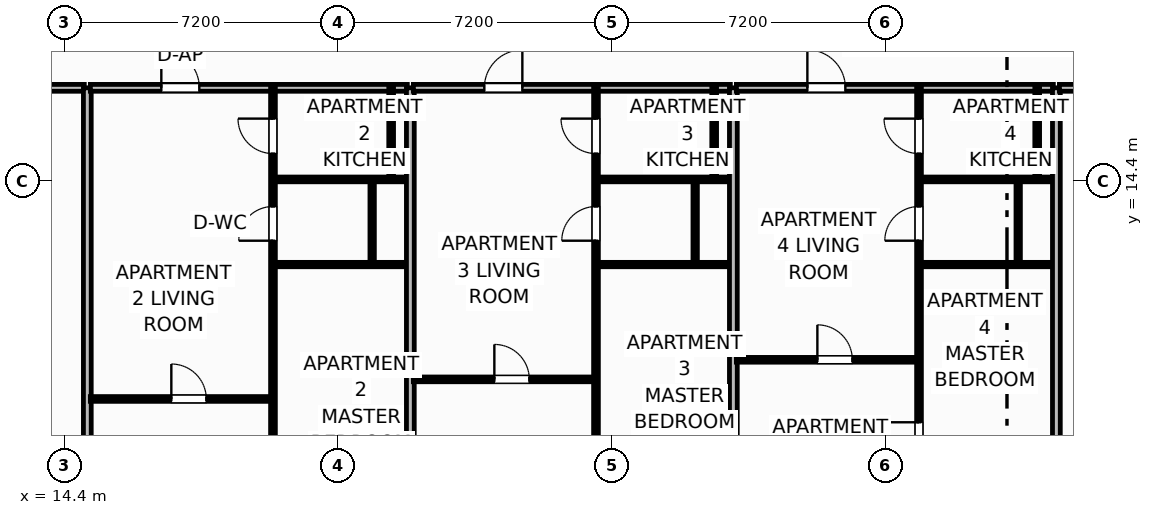
"""IFC4 building model, lengths in metres.
Left out: names, types, materials, properties, quantities, classifications, styles, units other than length and angle.
Written with IfcOpenShell. Run it as: python <this file> out.ifc"""

import sys

from ifc_helpers import new_model, si_unit, direction, frame, frame_2d, origin, place, context, subcontext, project, spatial, rectangle, extrude, element, fill, save


model = new_model("IFC4")
c1 = context("Model", 3, precision=1e-05, world=origin(), true_north=direction((0.0, 1.0)))
c2 = subcontext(c1, "Body", "Model", "MODEL_VIEW")
j1 = project(units=[si_unit("LENGTHUNIT", "METRE"), si_unit("PLANEANGLEUNIT", "RADIAN")], contexts=[c1])
p1 = place(None, origin())
s1 = spatial("IfcSite", under=j1, at=p1, CompositionType="ELEMENT")
p2 = place(p1, origin())
s2 = spatial("IfcBuilding", under=s1, at=p2, CompositionType="ELEMENT")
p3 = place(p2, frame((0.0, 0.0, 196.8)))
s3 = spatial("IfcBuildingStorey", under=s2, at=p3, CompositionType="ELEMENT", Elevation=196.8)
p4 = place(p3, frame((4.847, 16.85, 0.0), z_axis=(0.0, 0.0, 1.0), x_axis=(1.0, 0.0, 0.0)))
e1 = element("IfcWall", 1, at=p4, inside=s3, PredefinedType="PARTITIONING", context=c2, shape_type="SweptSolid", body=[
    extrude(rectangle(XDim=10.073, YDim=0.18, at=frame_2d((5.037, 0.0))), origin(), (0.0, 0.0, 1.0), 3.45),
])
p5 = place(p4, frame((7.878, 0.0, 0.0)))
e2 = element("IfcOpeningElement", 2, at=p5, cuts=e1, PredefinedType="OPENING", context=c2, shape_type="SweptSolid", body=[
    extrude(rectangle(XDim=0.95, YDim=2.05, at=frame_2d((0.475, 1.025))), frame((0.0, 0.1, 0.0), z_axis=(0.0, -1.0, 0.0), x_axis=(1.0, 0.0, 0.0)), (0.0, 0.0, 1.0), 0.2),
])
p6 = place(p3, frame((15.0, 0.447, 0.0), z_axis=(0.0, 0.0, 1.0), x_axis=(0.0, 1.0, 0.0)))
e3 = element("IfcWall", 3, at=p6, inside=s3, PredefinedType="PARTITIONING", context=c2, shape_type="SweptSolid", body=[
    extrude(rectangle(XDim=16.403, YDim=0.205, at=frame_2d((8.202, 0.0))), origin(), (0.0, 0.0, 1.0), 3.45),
])
p7 = place(p3, frame((15.08, 8.663, 0.0), z_axis=(0.0, 0.0, 1.0), x_axis=(1.0, 0.0, 0.0)))
e4 = element("IfcWall", 4, at=p7, inside=s3, PredefinedType="PARTITIONING", context=c2, shape_type="SweptSolid", body=[
    extrude(rectangle(XDim=4.735, YDim=0.125, at=frame_2d((2.368, 0.0))), origin(), (0.0, 0.0, 1.0), 3.45),
])
p8 = place(p7, frame((2.131, 0.0, 0.0)))
e5 = element("IfcOpeningElement", 5, at=p8, cuts=e4, PredefinedType="OPENING", context=c2, shape_type="SweptSolid", body=[
    extrude(rectangle(XDim=0.92, YDim=2.05, at=frame_2d((0.46, 1.025))), frame((0.0, 0.073, 0.0), z_axis=(0.0, -1.0, 0.0), x_axis=(1.0, 0.0, 0.0)), (0.0, 0.0, 1.0), 0.145),
])
p9 = place(p3, frame((15.08, 16.85, 0.0), z_axis=(0.0, 0.0, 1.0), x_axis=(1.0, 0.0, 0.0)))
e6 = element("IfcWall", 6, at=p9, inside=s3, PredefinedType="PARTITIONING", context=c2, shape_type="SweptSolid", body=[
    extrude(rectangle(XDim=8.34, YDim=0.18, at=frame_2d((4.17, 0.0))), origin(), (0.0, 0.0, 1.0), 3.45),
])
p10 = place(p9, frame((1.868, 0.0, 0.0)))
e7 = element("IfcOpeningElement", 7, at=p10, cuts=e6, PredefinedType="OPENING", context=c2, shape_type="SweptSolid", body=[
    extrude(rectangle(XDim=1.0, YDim=2.2, at=frame_2d((0.5, 1.1))), frame((0.0, 0.1, 0.0), z_axis=(0.0, -1.0, 0.0), x_axis=(1.0, 0.0, 0.0)), (0.0, 0.0, 1.0), 0.2),
])
p11 = place(p3, frame((19.885, 1.039, 0.0), z_axis=(0.0, 0.0, 1.0), x_axis=(0.0, 1.0, 0.0)))
e8 = element("IfcWall", 8, at=p11, inside=s3, PredefinedType="PARTITIONING", context=c2, shape_type="SweptSolid", body=[
    extrude(rectangle(XDim=15.811, YDim=0.125, at=frame_2d((7.905, 0.0))), origin(), (0.0, 0.0, 1.0), 3.45),
])
p12 = place(p11, frame((5.06, 0.0, 0.0)))
e9 = element("IfcOpeningElement", 9, at=p12, cuts=e8, PredefinedType="OPENING", context=c2, shape_type="SweptSolid", body=[
    extrude(rectangle(XDim=0.92, YDim=2.05, at=frame_2d((0.46, 1.025))), frame((0.0, 0.073, 0.0), z_axis=(0.0, -1.0, 0.0), x_axis=(1.0, 0.0, 0.0)), (0.0, 0.0, 1.0), 0.145),
])
p13 = place(p11, frame((11.788, 0.0, 0.0)))
e10 = element("IfcOpeningElement", 10, at=p13, cuts=e8, PredefinedType="OPENING", context=c2, shape_type="SweptSolid", body=[
    extrude(rectangle(XDim=0.9, YDim=2.05, at=frame_2d((0.45, 1.025))), frame((0.0, 0.073, 0.0), z_axis=(0.0, -1.0, 0.0), x_axis=(1.0, 0.0, 0.0)), (0.0, 0.0, 1.0), 0.145),
])
p14 = place(p11, frame((14.081, 0.0, 0.0)))
e11 = element("IfcOpeningElement", 11, at=p14, cuts=e8, PredefinedType="OPENING", context=c2, shape_type="SweptSolid", body=[
    extrude(rectangle(XDim=0.92, YDim=2.05, at=frame_2d((0.46, 1.025))), frame((0.0, 0.073, 0.0), z_axis=(0.0, -1.0, 0.0), x_axis=(1.0, 0.0, 0.0)), (0.0, 0.0, 1.0), 0.145),
])
p15 = place(p3, frame((19.955, 14.44, 0.0), z_axis=(0.0, 0.0, 1.0), x_axis=(1.0, 0.0, 0.0)))
e12 = element("IfcWall", 12, at=p15, inside=s3, PredefinedType="PARTITIONING", context=c2, shape_type="SweptSolid", body=[
    extrude(rectangle(XDim=3.465, YDim=0.125, at=frame_2d((1.732, 0.0))), origin(), (0.0, 0.0, 1.0), 3.45),
])
p16 = place(p3, frame((19.955, 12.2, 0.0), z_axis=(0.0, 0.0, 1.0), x_axis=(1.0, 0.0, 0.0)))
e13 = element("IfcWall", 13, at=p16, inside=s3, PredefinedType="PARTITIONING", context=c2, shape_type="SweptSolid", body=[
    extrude(rectangle(XDim=3.465, YDim=0.115, at=frame_2d((1.732, 0.0))), origin(), (0.0, 0.0, 1.0), 3.45),
])
p17 = place(p3, frame((22.995, 14.44, 0.0), z_axis=(0.0, 0.0, 1.0), x_axis=(0.0, 1.0, 0.0)))
e14 = element("IfcWall", 14, at=p17, inside=s3, PredefinedType="PARTITIONING", context=c2, shape_type="SweptSolid", body=[
    extrude(rectangle(XDim=2.41, YDim=0.125, at=frame_2d((1.205, 0.0))), origin(), (0.0, 0.0, 1.0), 3.45),
])
p18 = place(p3, frame((22.495, 12.2, 0.0), z_axis=(0.0, 0.0, 1.0), x_axis=(0.0, 1.0, 0.0)))
e15 = element("IfcWall", 15, at=p18, inside=s3, PredefinedType="PARTITIONING", context=c2, shape_type="SweptSolid", body=[
    extrude(rectangle(XDim=2.24, YDim=0.115, at=frame_2d((1.12, 0.0))), origin(), (0.0, 0.0, 1.0), 3.45),
])
p19 = place(p3, frame((23.5, 1.478, 0.0), z_axis=(0.0, 0.0, 1.0), x_axis=(0.0, 1.0, 0.0)))
e16 = element("IfcWall", 16, at=p19, inside=s3, PredefinedType="PARTITIONING", context=c2, shape_type="SweptSolid", body=[
    extrude(rectangle(XDim=15.373, YDim=0.205, at=frame_2d((7.686, 0.0))), origin(), (0.0, 0.0, 1.0), 2.662),
])
p20 = place(p3, frame((23.58, 9.179, 0.0), z_axis=(0.0, 0.0, 1.0), x_axis=(1.0, 0.0, 0.0)))
e17 = element("IfcWall", 17, at=p20, inside=s3, PredefinedType="PARTITIONING", context=c2, shape_type="SweptSolid", body=[
    extrude(rectangle(XDim=4.735, YDim=0.125, at=frame_2d((2.368, 0.0))), origin(), (0.0, 0.0, 1.0), 3.018),
])
p21 = place(p20, frame((2.131, 0.0, 0.0)))
e18 = element("IfcOpeningElement", 18, at=p21, cuts=e17, PredefinedType="OPENING", context=c2, shape_type="SweptSolid", body=[
    extrude(rectangle(XDim=0.92, YDim=2.05, at=frame_2d((0.46, 1.025))), frame((0.0, 0.073, 0.0), z_axis=(0.0, -1.0, 0.0), x_axis=(1.0, 0.0, 0.0)), (0.0, 0.0, 1.0), 0.145),
])
p22 = place(p3, frame((23.58, 16.85, 0.0), z_axis=(0.0, 0.0, 1.0), x_axis=(1.0, 0.0, 0.0)))
e19 = element("IfcWall", 19, at=p22, inside=s3, PredefinedType="PARTITIONING", context=c2, shape_type="SweptSolid", body=[
    extrude(rectangle(XDim=8.34, YDim=0.18, at=frame_2d((4.17, 0.0))), origin(), (0.0, 0.0, 1.0), 3.45),
])
p23 = place(p22, frame((1.868, 0.0, 0.0)))
e20 = element("IfcOpeningElement", 20, at=p23, cuts=e19, PredefinedType="OPENING", context=c2, shape_type="SweptSolid", body=[
    extrude(rectangle(XDim=1.0, YDim=2.2, at=frame_2d((0.5, 1.1))), frame((0.0, 0.1, 0.0), z_axis=(0.0, -1.0, 0.0), x_axis=(1.0, 0.0, 0.0)), (0.0, 0.0, 1.0), 0.2),
])
p24 = place(p3, frame((28.385, 4.185, 0.0), z_axis=(0.0, 0.0, 1.0), x_axis=(0.0, 1.0, 0.0)))
e21 = element("IfcWall", 21, at=p24, inside=s3, PredefinedType="PARTITIONING", context=c2, shape_type="SweptSolid", body=[
    extrude(rectangle(XDim=12.665, YDim=0.125, at=frame_2d((6.333, 0.0))), origin(), (0.0, 0.0, 1.0), 3.45),
])
p25 = place(p24, frame((2.531, 0.0, 0.0)))
e22 = element("IfcOpeningElement", 22, at=p25, cuts=e21, PredefinedType="OPENING", context=c2, shape_type="SweptSolid", body=[
    extrude(rectangle(XDim=0.92, YDim=2.05, at=frame_2d((0.46, 1.025))), frame((0.0, 0.073, 0.0), z_axis=(0.0, -1.0, 0.0), x_axis=(1.0, 0.0, 0.0)), (0.0, 0.0, 1.0), 0.145),
])
p26 = place(p24, frame((8.642, 0.0, 0.0)))
e23 = element("IfcOpeningElement", 23, at=p26, cuts=e21, PredefinedType="OPENING", context=c2, shape_type="SweptSolid", body=[
    extrude(rectangle(XDim=0.9, YDim=2.05, at=frame_2d((0.45, 1.025))), frame((0.0, 0.073, 0.0), z_axis=(0.0, -1.0, 0.0), x_axis=(1.0, 0.0, 0.0)), (0.0, 0.0, 1.0), 0.145),
])
p27 = place(p24, frame((10.935, 0.0, 0.0)))
e24 = element("IfcOpeningElement", 24, at=p27, cuts=e21, PredefinedType="OPENING", context=c2, shape_type="SweptSolid", body=[
    extrude(rectangle(XDim=0.92, YDim=2.05, at=frame_2d((0.46, 1.025))), frame((0.0, 0.073, 0.0), z_axis=(0.0, -1.0, 0.0), x_axis=(1.0, 0.0, 0.0)), (0.0, 0.0, 1.0), 0.145),
])
p28 = place(p3, frame((28.455, 14.44, 0.0), z_axis=(0.0, 0.0, 1.0), x_axis=(1.0, 0.0, 0.0)))
e25 = element("IfcWall", 25, at=p28, inside=s3, PredefinedType="PARTITIONING", context=c2, shape_type="SweptSolid", body=[
    extrude(rectangle(XDim=3.465, YDim=0.125, at=frame_2d((1.732, 0.0))), origin(), (0.0, 0.0, 1.0), 3.45),
])
p29 = place(p3, frame((28.455, 12.2, 0.0), z_axis=(0.0, 0.0, 1.0), x_axis=(1.0, 0.0, 0.0)))
e26 = element("IfcWall", 26, at=p29, inside=s3, PredefinedType="PARTITIONING", context=c2, shape_type="SweptSolid", body=[
    extrude(rectangle(XDim=3.465, YDim=0.115, at=frame_2d((1.732, 0.0))), origin(), (0.0, 0.0, 1.0), 3.45),
])
p30 = place(p3, frame((31.495, 14.44, 0.0), z_axis=(0.0, 0.0, 1.0), x_axis=(0.0, 1.0, 0.0)))
e27 = element("IfcWall", 27, at=p30, inside=s3, PredefinedType="PARTITIONING", context=c2, shape_type="SweptSolid", body=[
    extrude(rectangle(XDim=2.41, YDim=0.125, at=frame_2d((1.205, 0.0))), origin(), (0.0, 0.0, 1.0), 3.45),
])
p31 = place(p3, frame((30.995, 12.2, 0.0), z_axis=(0.0, 0.0, 1.0), x_axis=(0.0, 1.0, 0.0)))
e28 = element("IfcWall", 28, at=p31, inside=s3, PredefinedType="PARTITIONING", context=c2, shape_type="SweptSolid", body=[
    extrude(rectangle(XDim=2.24, YDim=0.115, at=frame_2d((1.12, 0.0))), origin(), (0.0, 0.0, 1.0), 3.45),
])
p32 = place(p3, frame((32.0, 2.508, 0.0), z_axis=(0.0, 0.0, 1.0), x_axis=(0.0, 1.0, 0.0)))
e29 = element("IfcWall", 29, at=p32, inside=s3, PredefinedType="PARTITIONING", context=c2, shape_type="SweptSolid", body=[
    extrude(rectangle(XDim=14.342, YDim=0.205, at=frame_2d((7.171, 0.0))), origin(), (0.0, 0.0, 1.0), 3.45),
])
p33 = place(p3, frame((32.08, 9.694, 0.0), z_axis=(0.0, 0.0, 1.0), x_axis=(1.0, 0.0, 0.0)))
e30 = element("IfcWall", 30, at=p33, inside=s3, PredefinedType="PARTITIONING", context=c2, shape_type="SweptSolid", body=[
    extrude(rectangle(XDim=4.735, YDim=0.125, at=frame_2d((2.368, 0.0))), origin(), (0.0, 0.0, 1.0), 3.45),
])
p34 = place(p33, frame((2.131, 0.0, 0.0)))
e31 = element("IfcOpeningElement", 31, at=p34, cuts=e30, PredefinedType="OPENING", context=c2, shape_type="SweptSolid", body=[
    extrude(rectangle(XDim=0.92, YDim=2.05, at=frame_2d((0.46, 1.025))), frame((0.0, 0.073, 0.0), z_axis=(0.0, -1.0, 0.0), x_axis=(1.0, 0.0, 0.0)), (0.0, 0.0, 1.0), 0.145),
])
p35 = place(p3, frame((32.08, 16.85, 0.0), z_axis=(0.0, 0.0, 1.0), x_axis=(1.0, 0.0, 0.0)))
e32 = element("IfcWall", 32, at=p35, inside=s3, PredefinedType="PARTITIONING", context=c2, shape_type="SweptSolid", body=[
    extrude(rectangle(XDim=8.34, YDim=0.18, at=frame_2d((4.17, 0.0))), origin(), (0.0, 0.0, 1.0), 3.45),
])
p36 = place(p35, frame((1.868, 0.0, 0.0)))
e33 = element("IfcOpeningElement", 33, at=p36, cuts=e32, PredefinedType="OPENING", context=c2, shape_type="SweptSolid", body=[
    extrude(rectangle(XDim=1.0, YDim=2.2, at=frame_2d((0.5, 1.1))), frame((0.0, 0.1, 0.0), z_axis=(0.0, -1.0, 0.0), x_axis=(1.0, 0.0, 0.0)), (0.0, 0.0, 1.0), 0.2),
])
p37 = place(p3, frame((36.885, 3.1, 0.0), z_axis=(0.0, 0.0, 1.0), x_axis=(0.0, 1.0, 0.0)))
e34 = element("IfcWall", 34, at=p37, inside=s3, PredefinedType="PARTITIONING", context=c2, shape_type="SweptSolid", body=[
    extrude(rectangle(XDim=13.75, YDim=0.125, at=frame_2d((6.875, 0.0))), origin(), (0.0, 0.0, 1.0), 3.45),
])
p38 = place(p37, frame((4.03, 0.0, 0.0)))
e35 = element("IfcOpeningElement", 35, at=p38, cuts=e34, PredefinedType="OPENING", context=c2, shape_type="SweptSolid", body=[
    extrude(rectangle(XDim=0.92, YDim=2.05, at=frame_2d((0.46, 1.025))), frame((0.0, 0.073, 0.0), z_axis=(0.0, -1.0, 0.0), x_axis=(1.0, 0.0, 0.0)), (0.0, 0.0, 1.0), 0.145),
])
p39 = place(p37, frame((9.727, 0.0, 0.0)))
e36 = element("IfcOpeningElement", 36, at=p39, cuts=e34, PredefinedType="OPENING", context=c2, shape_type="SweptSolid", body=[
    extrude(rectangle(XDim=0.9, YDim=2.05, at=frame_2d((0.45, 1.025))), frame((0.0, 0.073, 0.0), z_axis=(0.0, -1.0, 0.0), x_axis=(1.0, 0.0, 0.0)), (0.0, 0.0, 1.0), 0.145),
])
p40 = place(p37, frame((12.02, 0.0, 0.0)))
e37 = element("IfcOpeningElement", 37, at=p40, cuts=e34, PredefinedType="OPENING", context=c2, shape_type="SweptSolid", body=[
    extrude(rectangle(XDim=0.92, YDim=2.05, at=frame_2d((0.46, 1.025))), frame((0.0, 0.073, 0.0), z_axis=(0.0, -1.0, 0.0), x_axis=(1.0, 0.0, 0.0)), (0.0, 0.0, 1.0), 0.145),
])
p41 = place(p3, frame((36.955, 14.44, 0.0), z_axis=(0.0, 0.0, 1.0), x_axis=(1.0, 0.0, 0.0)))
e38 = element("IfcWall", 38, at=p41, inside=s3, PredefinedType="PARTITIONING", context=c2, shape_type="SweptSolid", body=[
    extrude(rectangle(XDim=3.465, YDim=0.125, at=frame_2d((1.732, 0.0))), origin(), (0.0, 0.0, 1.0), 3.45),
])
p42 = place(p3, frame((36.955, 12.2, 0.0), z_axis=(0.0, 0.0, 1.0), x_axis=(1.0, 0.0, 0.0)))
e39 = element("IfcWall", 39, at=p42, inside=s3, PredefinedType="PARTITIONING", context=c2, shape_type="SweptSolid", body=[
    extrude(rectangle(XDim=3.465, YDim=0.115, at=frame_2d((1.732, 0.0))), origin(), (0.0, 0.0, 1.0), 3.45),
])
p43 = place(p3, frame((39.995, 14.44, 0.0), z_axis=(0.0, 0.0, 1.0), x_axis=(0.0, 1.0, 0.0)))
e40 = element("IfcWall", 40, at=p43, inside=s3, PredefinedType="PARTITIONING", context=c2, shape_type="SweptSolid", body=[
    extrude(rectangle(XDim=2.41, YDim=0.125, at=frame_2d((1.205, 0.0))), origin(), (0.0, 0.0, 1.0), 3.45),
])
p44 = place(p3, frame((39.495, 12.2, 0.0), z_axis=(0.0, 0.0, 1.0), x_axis=(0.0, 1.0, 0.0)))
e41 = element("IfcWall", 41, at=p44, inside=s3, PredefinedType="PARTITIONING", context=c2, shape_type="SweptSolid", body=[
    extrude(rectangle(XDim=2.24, YDim=0.115, at=frame_2d((1.12, 0.0))), origin(), (0.0, 0.0, 1.0), 3.45),
])
p45 = place(p3, frame((40.5, 5.654, 0.0), z_axis=(0.0, 0.0, 1.0), x_axis=(0.0, 1.0, 0.0)))
e42 = element("IfcWall", 42, at=p45, inside=s3, PredefinedType="PARTITIONING", context=c2, shape_type="SweptSolid", body=[
    extrude(rectangle(XDim=11.196, YDim=0.205, at=frame_2d((5.598, 0.0))), origin(), (0.0, 0.0, 1.0), 3.45),
])
p46 = place(p3, frame((40.58, 16.85, 0.0), z_axis=(0.0, 0.0, 1.0), x_axis=(1.0, 0.0, 0.0)))
e43 = element("IfcWall", 43, at=p46, inside=s3, PredefinedType="PARTITIONING", context=c2, shape_type="SweptSolid", body=[
    extrude(rectangle(XDim=8.34, YDim=0.18, at=frame_2d((4.17, 0.0))), origin(), (0.0, 0.0, 1.0), 3.45),
])
p47 = place(p46, frame((1.868, 0.0, 0.0)))
e44 = element("IfcOpeningElement", 44, at=p47, cuts=e43, PredefinedType="OPENING", context=c2, shape_type="SweptSolid", body=[
    extrude(rectangle(XDim=1.0, YDim=2.2, at=frame_2d((0.5, 1.1))), frame((0.0, 0.1, 0.0), z_axis=(0.0, -1.0, 0.0), x_axis=(1.0, 0.0, 0.0)), (0.0, 0.0, 1.0), 0.2),
])
p48 = place(p8, origin())
e45 = element("IfcDoor", 45, at=p48, inside=s3, OperationType="SINGLE_SWING_LEFT", PredefinedType="DOOR", context=c2, shape_type="SweptSolid", body=[
    extrude(rectangle(XDim=0.92, YDim=2.05, at=frame_2d((0.46, 1.025))), frame((0.0, 0.025, 0.0), z_axis=(0.0, -1.0, 0.0), x_axis=(1.0, 0.0, 0.0)), (0.0, 0.0, 1.0), 0.05),
])
fill(e5, e45)
p49 = place(p10, origin())
e46 = element("IfcDoor", 46, at=p49, inside=s3, OperationType="SINGLE_SWING_LEFT", PredefinedType="DOOR", context=c2, shape_type="SweptSolid", body=[
    extrude(rectangle(XDim=1.0, YDim=2.2, at=frame_2d((0.5, 1.1))), frame((0.0, 0.025, 0.0), z_axis=(0.0, -1.0, 0.0), x_axis=(1.0, 0.0, 0.0)), (0.0, 0.0, 1.0), 0.05),
])
fill(e7, e46)
p50 = place(p13, origin())
e47 = element("IfcDoor", 47, at=p50, inside=s3, OperationType="SINGLE_SWING_LEFT", PredefinedType="DOOR", context=c2, shape_type="SweptSolid", body=[
    extrude(rectangle(XDim=0.9, YDim=2.05, at=frame_2d((0.45, 1.025))), frame((0.0, 0.025, 0.0), z_axis=(0.0, -1.0, 0.0), x_axis=(1.0, 0.0, 0.0)), (0.0, 0.0, 1.0), 0.05),
])
fill(e10, e47)
p51 = place(p14, origin())
e48 = element("IfcDoor", 48, at=p51, inside=s3, OperationType="SINGLE_SWING_RIGHT", PredefinedType="DOOR", context=c2, shape_type="SweptSolid", body=[
    extrude(rectangle(XDim=0.92, YDim=2.05, at=frame_2d((0.46, 1.025))), frame((0.0, 0.025, 0.0), z_axis=(0.0, -1.0, 0.0), x_axis=(1.0, 0.0, 0.0)), (0.0, 0.0, 1.0), 0.05),
])
fill(e11, e48)
p52 = place(p21, origin())
e49 = element("IfcDoor", 49, at=p52, inside=s3, OperationType="SINGLE_SWING_LEFT", PredefinedType="DOOR", context=c2, shape_type="SweptSolid", body=[
    extrude(rectangle(XDim=0.92, YDim=2.05, at=frame_2d((0.46, 1.025))), frame((0.0, 0.025, 0.0), z_axis=(0.0, -1.0, 0.0), x_axis=(1.0, 0.0, 0.0)), (0.0, 0.0, 1.0), 0.05),
])
fill(e18, e49)
p53 = place(p23, origin())
e50 = element("IfcDoor", 50, at=p53, inside=s3, OperationType="SINGLE_SWING_RIGHT", PredefinedType="DOOR", context=c2, shape_type="SweptSolid", body=[
    extrude(rectangle(XDim=1.0, YDim=2.2, at=frame_2d((0.5, 1.1))), frame((0.0, 0.025, 0.0), z_axis=(0.0, -1.0, 0.0), x_axis=(1.0, 0.0, 0.0)), (0.0, 0.0, 1.0), 0.05),
])
fill(e20, e50)
p54 = place(p26, origin())
e51 = element("IfcDoor", 51, at=p54, inside=s3, OperationType="SINGLE_SWING_LEFT", PredefinedType="DOOR", context=c2, shape_type="SweptSolid", body=[
    extrude(rectangle(XDim=0.9, YDim=2.05, at=frame_2d((0.45, 1.025))), frame((0.0, 0.025, 0.0), z_axis=(0.0, -1.0, 0.0), x_axis=(1.0, 0.0, 0.0)), (0.0, 0.0, 1.0), 0.05),
])
fill(e23, e51)
p55 = place(p27, origin())
e52 = element("IfcDoor", 52, at=p55, inside=s3, OperationType="SINGLE_SWING_RIGHT", PredefinedType="DOOR", context=c2, shape_type="SweptSolid", body=[
    extrude(rectangle(XDim=0.92, YDim=2.05, at=frame_2d((0.46, 1.025))), frame((0.0, 0.025, 0.0), z_axis=(0.0, -1.0, 0.0), x_axis=(1.0, 0.0, 0.0)), (0.0, 0.0, 1.0), 0.05),
])
fill(e24, e52)
p56 = place(p34, origin())
e53 = element("IfcDoor", 53, at=p56, inside=s3, OperationType="SINGLE_SWING_LEFT", PredefinedType="DOOR", context=c2, shape_type="SweptSolid", body=[
    extrude(rectangle(XDim=0.92, YDim=2.05, at=frame_2d((0.46, 1.025))), frame((0.0, 0.025, 0.0), z_axis=(0.0, -1.0, 0.0), x_axis=(1.0, 0.0, 0.0)), (0.0, 0.0, 1.0), 0.05),
])
fill(e31, e53)
p57 = place(p36, origin())
e54 = element("IfcDoor", 54, at=p57, inside=s3, OperationType="SINGLE_SWING_LEFT", PredefinedType="DOOR", context=c2, shape_type="SweptSolid", body=[
    extrude(rectangle(XDim=1.0, YDim=2.2, at=frame_2d((0.5, 1.1))), frame((0.0, 0.025, 0.0), z_axis=(0.0, -1.0, 0.0), x_axis=(1.0, 0.0, 0.0)), (0.0, 0.0, 1.0), 0.05),
])
fill(e33, e54)
p58 = place(p38, origin())
e55 = element("IfcDoor", 55, at=p58, inside=s3, OperationType="SINGLE_SWING_RIGHT", PredefinedType="DOOR", context=c2, shape_type="SweptSolid", body=[
    extrude(rectangle(XDim=0.92, YDim=2.05, at=frame_2d((0.46, 1.025))), frame((0.0, 0.025, 0.0), z_axis=(0.0, -1.0, 0.0), x_axis=(1.0, 0.0, 0.0)), (0.0, 0.0, 1.0), 0.05),
])
fill(e35, e55)
p59 = place(p39, origin())
e56 = element("IfcDoor", 56, at=p59, inside=s3, OperationType="SINGLE_SWING_LEFT", PredefinedType="DOOR", context=c2, shape_type="SweptSolid", body=[
    extrude(rectangle(XDim=0.9, YDim=2.05, at=frame_2d((0.45, 1.025))), frame((0.0, 0.025, 0.0), z_axis=(0.0, -1.0, 0.0), x_axis=(1.0, 0.0, 0.0)), (0.0, 0.0, 1.0), 0.05),
])
fill(e36, e56)
p60 = place(p40, origin())
e57 = element("IfcDoor", 57, at=p60, inside=s3, OperationType="SINGLE_SWING_RIGHT", PredefinedType="DOOR", context=c2, shape_type="SweptSolid", body=[
    extrude(rectangle(XDim=0.92, YDim=2.05, at=frame_2d((0.46, 1.025))), frame((0.0, 0.025, 0.0), z_axis=(0.0, -1.0, 0.0), x_axis=(1.0, 0.0, 0.0)), (0.0, 0.0, 1.0), 0.05),
])
fill(e37, e57)
save(model, sys.argv[1])
